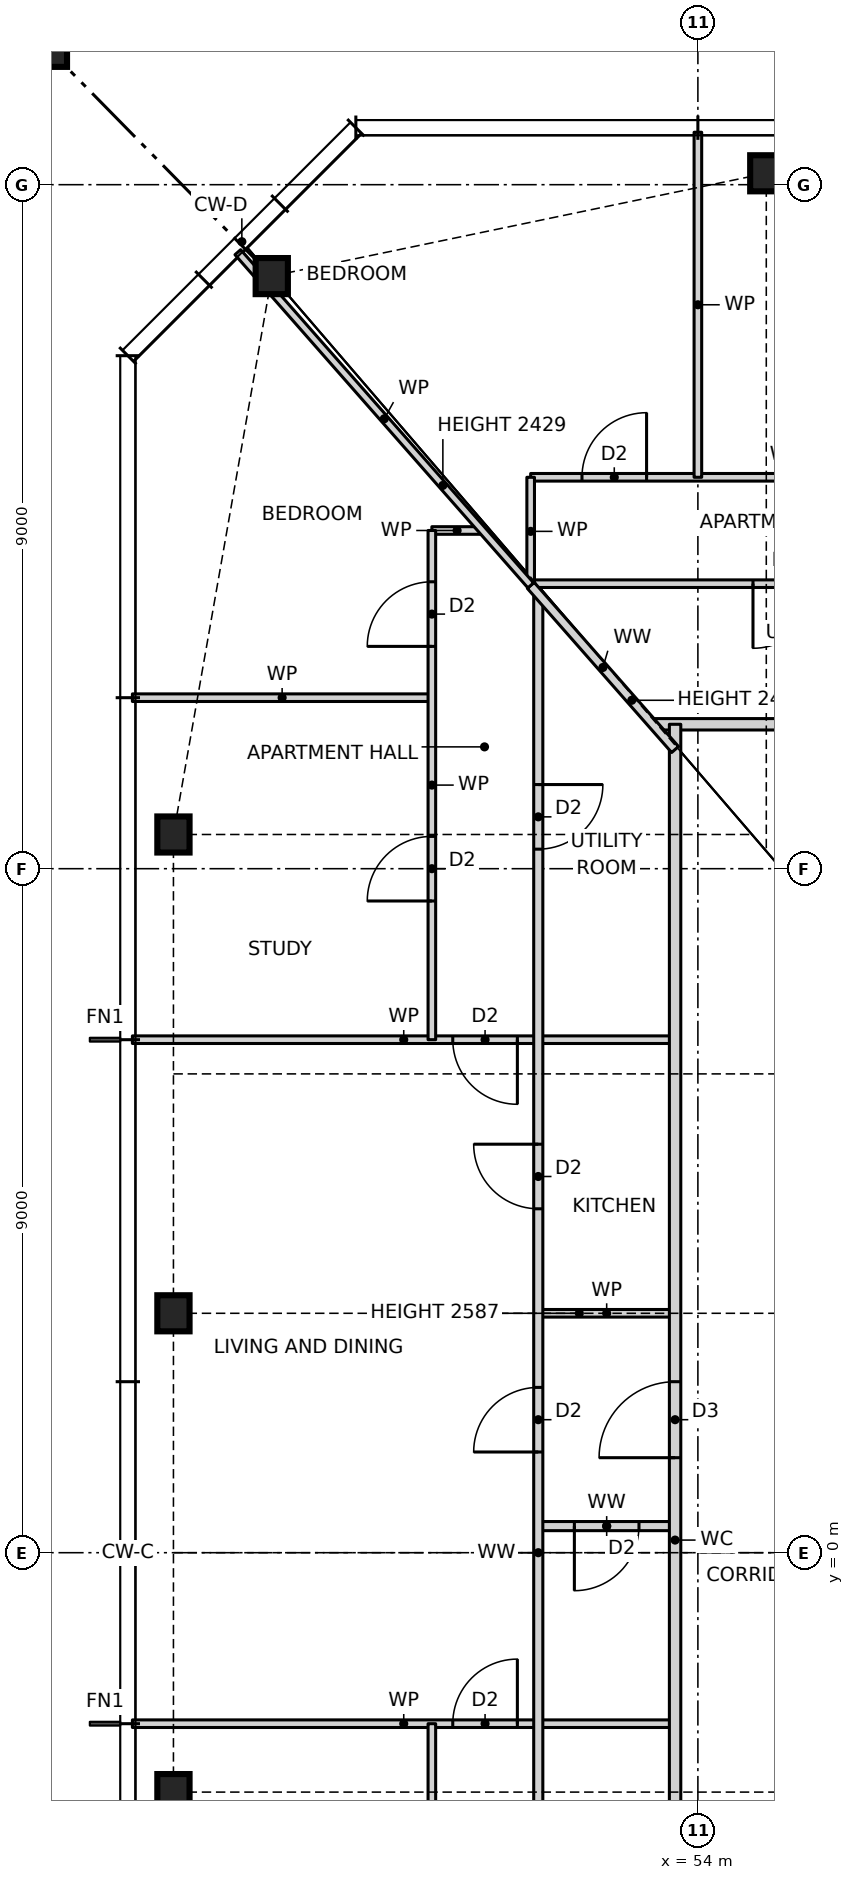
"""IFC4 building model, lengths in metres.
Left out: names, types, materials, properties, quantities, classifications, styles, units other than length and angle.
Written with IfcOpenShell. Run it as: python <this file> out.ifc"""

import sys

from ifc_helpers import new_model, si_unit, direction, frame, frame_2d, origin, origin_2d, place, context, subcontext, project, spatial, rectangle, hollow_rectangle, i_section, extrude, element, fill, save


model = new_model("IFC4")
c1 = context("Model", 3, precision=1e-05, world=origin(), true_north=direction((0.0, 1.0)))
c2 = subcontext(c1, "Body", "Model", "MODEL_VIEW")
j1 = project(units=[si_unit("LENGTHUNIT", "METRE"), si_unit("PLANEANGLEUNIT", "RADIAN")], contexts=[c1])
p1 = place(None, origin())
s1 = spatial("IfcSite", under=j1, at=p1, CompositionType="ELEMENT")
p2 = place(p1, origin())
s2 = spatial("IfcBuilding", under=s1, at=p2, CompositionType="ELEMENT")
p3 = place(p2, frame((0.0, 0.0, 36.0)))
s3 = spatial("IfcBuildingStorey", under=s2, at=p3, CompositionType="ELEMENT", Elevation=36.0)
for number, where, z_axis, x_axis in (
    (1, (54.9, 18.15, 0.0), (0.0, 0.0, 1.0), (1.0, 0.0, 0.0)),
    (2, (48.394, 16.797, 0.0), (0.0, 0.0, 1.0), (1.0, 0.0, 0.0)),
    (3, (47.1, 9.45, 0.0), (0.0, 0.0, 1.0), (1.0, 0.0, 0.0)),
    (4, (47.1, 3.15, 0.0), (0.0, 0.0, 1.0), (1.0, 0.0, 0.0)),
    (5, (47.1, -3.15, 0.0), (0.0, 0.0, 1.0), (1.0, 0.0, 0.0)),
):
    element("IfcColumn", number, at=place(p3, frame(where, z_axis=z_axis, x_axis=x_axis)), inside=s3, PredefinedType="COLUMN", context=c2, shape_type="SweptSolid", body=[
        extrude(i_section(OverallWidth=0.424, OverallDepth=0.475, WebThickness=0.048, FlangeThickness=0.077, at=origin_2d()), origin(), (0.0, 0.0, 1.0), 3.5),
    ])
p4 = place(p3, frame((45.1, 20.15, 0.0), z_axis=(0.0, 0.0, 1.0), x_axis=(1.0, 0.0, 0.0)))
e6 = element("IfcColumn", 6, at=p4, inside=s3, PredefinedType="COLUMN", context=c2, shape_type="SweptSolid", body=[
    extrude(hollow_rectangle(XDim=1.2, YDim=1.2, WallThickness=0.07, at=origin_2d()), origin(), (0.0, 0.0, 1.0), 3.5),
])
p5 = place(p3, frame((46.56, -2.25, 0.0), z_axis=(0.0, 0.0, 1.0), x_axis=(1.0, 0.0, 0.0)))
e7 = element("IfcWall", 7, at=p5, inside=s3, PredefinedType="PARTITIONING", context=c2, shape_type="SweptSolid", body=[
    extrude(rectangle(XDim=7.14, YDim=0.1, at=frame_2d((3.57, 0.0))), origin(), (0.0, 0.0, 1.0), 3.27),
])
p6 = place(p5, frame((4.215, 0.0, 0.0)))
e8 = element("IfcOpeningElement", 8, at=p6, cuts=e7, PredefinedType="OPENING", context=c2, shape_type="SweptSolid", body=[
    extrude(rectangle(XDim=0.85, YDim=2.1, at=frame_2d((0.425, 1.05))), frame((0.0, 0.06, 0.0), z_axis=(0.0, -1.0, 0.0), x_axis=(1.0, 0.0, 0.0)), (0.0, 0.0, 1.0), 0.12),
])
p7 = place(p3, frame((51.9, 0.35, 0.0), z_axis=(0.0, 0.0, 1.0), x_axis=(1.0, 0.0, 0.0)))
e9 = element("IfcWall", 9, at=p7, inside=s3, PredefinedType="PARTITIONING", context=c2, shape_type="SweptSolid", body=[
    extrude(rectangle(XDim=1.8, YDim=0.12, at=frame_2d((0.9, 0.0))), origin(), (0.0, 0.0, 1.0), 3.27),
])
p8 = place(p7, frame((0.475, 0.0, 0.0)))
e10 = element("IfcOpeningElement", 10, at=p8, cuts=e9, PredefinedType="OPENING", context=c2, shape_type="SweptSolid", body=[
    extrude(rectangle(XDim=0.85, YDim=2.1, at=frame_2d((0.425, 1.05))), frame((0.0, 0.07, 0.0), z_axis=(0.0, -1.0, 0.0), x_axis=(1.0, 0.0, 0.0)), (0.0, 0.0, 1.0), 0.14),
])
p9 = place(p3, frame((51.9, 3.15, 0.0), z_axis=(0.0, 0.0, 1.0), x_axis=(1.0, 0.0, 0.0)))
e11 = element("IfcWall", 11, at=p9, inside=s3, PredefinedType="PARTITIONING", context=c2, shape_type="SweptSolid", body=[
    extrude(rectangle(XDim=1.8, YDim=0.1, at=frame_2d((0.9, 0.0))), origin(), (0.0, 0.0, 1.0), 2.587),
])
p10 = place(p3, frame((46.56, 6.75, 0.0), z_axis=(0.0, 0.0, 1.0), x_axis=(1.0, 0.0, 0.0)))
e12 = element("IfcWall", 12, at=p10, inside=s3, PredefinedType="PARTITIONING", context=c2, shape_type="SweptSolid", body=[
    extrude(rectangle(XDim=7.14, YDim=0.1, at=frame_2d((3.57, 0.0))), origin(), (0.0, 0.0, 1.0), 3.27),
])
p11 = place(p10, frame((4.215, 0.0, 0.0)))
e13 = element("IfcOpeningElement", 13, at=p11, cuts=e12, PredefinedType="OPENING", context=c2, shape_type="SweptSolid", body=[
    extrude(rectangle(XDim=0.85, YDim=2.1, at=frame_2d((0.425, 1.05))), frame((0.0, 0.06, 0.0), z_axis=(0.0, -1.0, 0.0), x_axis=(1.0, 0.0, 0.0)), (0.0, 0.0, 1.0), 0.12),
])
p12 = place(p3, frame((53.408, 10.9, 0.0), z_axis=(0.0, 0.0, 1.0), x_axis=(1.0, 0.0, 0.0)))
e14 = element("IfcWall", 14, at=p12, inside=s3, PredefinedType="PARTITIONING", context=c2, shape_type="SweptSolid", body=[
    extrude(rectangle(XDim=19.184, YDim=0.15, at=frame_2d((9.592, 0.0))), origin(), (0.0, 0.0, 1.0), 3.27),
])
p13 = place(p12, frame((8.592, 0.0, 0.0)))
e15 = element("IfcOpeningElement", 15, at=p13, cuts=e14, PredefinedType="OPENING", context=c2, shape_type="SweptSolid", body=[
    extrude(rectangle(XDim=1.0, YDim=2.1, at=frame_2d((0.5, 1.05))), frame((0.0, 0.085, 0.0), z_axis=(0.0, -1.0, 0.0), x_axis=(1.0, 0.0, 0.0)), (0.0, 0.0, 1.0), 0.17),
])
p14 = place(p3, frame((46.56, 11.25, 0.0), z_axis=(0.0, 0.0, 1.0), x_axis=(1.0, 0.0, 0.0)))
e16 = element("IfcWall", 16, at=p14, inside=s3, PredefinedType="PARTITIONING", context=c2, shape_type="SweptSolid", body=[
    extrude(rectangle(XDim=3.94, YDim=0.1, at=frame_2d((1.97, 0.0))), origin(), (0.0, 0.0, 1.0), 3.27),
])
p15 = place(p3, frame((51.8, 12.75, 0.0), z_axis=(0.0, 0.0, 1.0), x_axis=(1.0, 0.0, 0.0)))
e17 = element("IfcWall", 17, at=p15, inside=s3, PredefinedType="PARTITIONING", context=c2, shape_type="SweptSolid", body=[
    extrude(rectangle(XDim=22.4, YDim=0.1, at=frame_2d((11.2, 0.0))), origin(), (0.0, 0.0, 1.0), 3.27),
])
p16 = place(p15, frame((13.475, 0.0, 0.0)))
e18 = element("IfcOpeningElement", 18, at=p16, cuts=e17, PredefinedType="OPENING", context=c2, shape_type="SweptSolid", body=[
    extrude(rectangle(XDim=0.85, YDim=2.1, at=frame_2d((0.425, 1.05))), frame((0.0, 0.06, 0.0), z_axis=(0.0, -1.0, 0.0), x_axis=(1.0, 0.0, 0.0)), (0.0, 0.0, 1.0), 0.12),
])
p17 = place(p15, frame((10.275, 0.0, 0.0)))
e19 = element("IfcOpeningElement", 19, at=p17, cuts=e17, PredefinedType="OPENING", context=c2, shape_type="SweptSolid", body=[
    extrude(rectangle(XDim=0.85, YDim=2.1, at=frame_2d((0.425, 1.05))), frame((0.0, 0.06, 0.0), z_axis=(0.0, -1.0, 0.0), x_axis=(1.0, 0.0, 0.0)), (0.0, 0.0, 1.0), 0.12),
])
p18 = place(p15, frame((18.625, 0.0, 0.0)))
e20 = element("IfcOpeningElement", 20, at=p18, cuts=e17, PredefinedType="OPENING", context=c2, shape_type="SweptSolid", body=[
    extrude(rectangle(XDim=0.85, YDim=2.1, at=frame_2d((0.425, 1.05))), frame((0.0, 0.06, 0.0), z_axis=(0.0, -1.0, 0.0), x_axis=(1.0, 0.0, 0.0)), (0.0, 0.0, 1.0), 0.12),
])
p19 = place(p15, frame((2.925, 0.0, 0.0)))
e21 = element("IfcOpeningElement", 21, at=p19, cuts=e17, PredefinedType="OPENING", context=c2, shape_type="SweptSolid", body=[
    extrude(rectangle(XDim=0.85, YDim=2.1, at=frame_2d((0.425, 1.05))), frame((0.0, 0.06, 0.0), z_axis=(0.0, -1.0, 0.0), x_axis=(1.0, 0.0, 0.0)), (0.0, 0.0, 1.0), 0.12),
])
p20 = place(p3, frame((50.5, 13.45, 0.0), z_axis=(0.0, 0.0, 1.0), x_axis=(1.0, 0.0, 0.0)))
e22 = element("IfcWall", 22, at=p20, inside=s3, PredefinedType="PARTITIONING", context=c2, shape_type="SweptSolid", body=[
    extrude(rectangle(XDim=0.664, YDim=0.1, at=frame_2d((0.332, 0.0))), origin(), (0.0, 0.0, 1.0), 3.27),
])
p21 = place(p3, frame((51.8, 14.15, 0.0), z_axis=(0.0, 0.0, 1.0), x_axis=(1.0, 0.0, 0.0)))
e23 = element("IfcWall", 23, at=p21, inside=s3, PredefinedType="PARTITIONING", context=c2, shape_type="SweptSolid", body=[
    extrude(rectangle(XDim=6.7, YDim=0.1, at=frame_2d((3.35, 0.0))), origin(), (0.0, 0.0, 1.0), 3.27),
])
p22 = place(p21, frame((4.025, 0.0, 0.0)))
e24 = element("IfcOpeningElement", 24, at=p22, cuts=e23, PredefinedType="OPENING", context=c2, shape_type="SweptSolid", body=[
    extrude(rectangle(XDim=0.85, YDim=2.1, at=frame_2d((0.425, 1.05))), frame((0.0, 0.06, 0.0), z_axis=(0.0, -1.0, 0.0), x_axis=(1.0, 0.0, 0.0)), (0.0, 0.0, 1.0), 0.12),
])
p23 = place(p21, frame((0.675, 0.0, 0.0)))
e25 = element("IfcOpeningElement", 25, at=p23, cuts=e23, PredefinedType="OPENING", context=c2, shape_type="SweptSolid", body=[
    extrude(rectangle(XDim=0.85, YDim=2.1, at=frame_2d((0.425, 1.05))), frame((0.0, 0.06, 0.0), z_axis=(0.0, -1.0, 0.0), x_axis=(1.0, 0.0, 0.0)), (0.0, 0.0, 1.0), 0.12),
])
p24 = place(p3, frame((54.0, 14.15, 0.0), z_axis=(0.0, 0.0, 1.0), x_axis=(0.0, 1.0, 0.0)))
e26 = element("IfcWall", 26, at=p24, inside=s3, PredefinedType="PARTITIONING", context=c2, shape_type="SweptSolid", body=[
    extrude(rectangle(XDim=4.54, YDim=0.1, at=frame_2d((2.27, 0.0))), origin(), (0.0, 0.0, 1.0), 3.27),
])
p25 = place(p3, frame((53.7, -10.568, 0.0), z_axis=(0.0, 0.0, 1.0), x_axis=(0.0, 1.0, 0.0)))
e27 = element("IfcWall", 27, at=p25, inside=s3, PredefinedType="PARTITIONING", context=c2, shape_type="SweptSolid", body=[
    extrude(rectangle(XDim=21.468, YDim=0.15, at=frame_2d((10.734, 0.0))), origin(), (0.0, 0.0, 1.0), 3.27),
])
p26 = place(p25, frame((11.818, 0.0, 0.0)))
e28 = element("IfcOpeningElement", 28, at=p26, cuts=e27, PredefinedType="OPENING", context=c2, shape_type="SweptSolid", body=[
    extrude(rectangle(XDim=1.0, YDim=2.1, at=frame_2d((0.5, 1.05))), frame((0.0, 0.085, 0.0), z_axis=(0.0, -1.0, 0.0), x_axis=(1.0, 0.0, 0.0)), (0.0, 0.0, 1.0), 0.17),
])
p27 = place(p3, frame((51.9, -12.614, 0.0), z_axis=(0.0, 0.0, 1.0), x_axis=(0.0, 1.0, 0.0)))
e29 = element("IfcWall", 29, at=p27, inside=s3, PredefinedType="PARTITIONING", context=c2, shape_type="SweptSolid", body=[
    extrude(rectangle(XDim=25.228, YDim=0.12, at=frame_2d((12.614, 0.0))), origin(), (0.0, 0.0, 1.0), 3.27),
])
p28 = place(p27, frame((17.139, 0.0, 0.0)))
e30 = element("IfcOpeningElement", 30, at=p28, cuts=e29, PredefinedType="OPENING", context=c2, shape_type="SweptSolid", body=[
    extrude(rectangle(XDim=0.85, YDim=2.1, at=frame_2d((0.425, 1.05))), frame((0.0, 0.07, 0.0), z_axis=(0.0, -1.0, 0.0), x_axis=(1.0, 0.0, 0.0)), (0.0, 0.0, 1.0), 0.14),
])
p29 = place(p27, frame((13.939, 0.0, 0.0)))
e31 = element("IfcOpeningElement", 31, at=p29, cuts=e29, PredefinedType="OPENING", context=c2, shape_type="SweptSolid", body=[
    extrude(rectangle(XDim=0.85, YDim=2.1, at=frame_2d((0.425, 1.05))), frame((0.0, 0.07, 0.0), z_axis=(0.0, -1.0, 0.0), x_axis=(1.0, 0.0, 0.0)), (0.0, 0.0, 1.0), 0.14),
])
p30 = place(p27, frame((21.871, 0.0, 0.0)))
e32 = element("IfcOpeningElement", 32, at=p30, cuts=e29, PredefinedType="OPENING", context=c2, shape_type="SweptSolid", body=[
    extrude(rectangle(XDim=0.85, YDim=2.1, at=frame_2d((0.425, 1.05))), frame((0.0, 0.07, 0.0), z_axis=(0.0, -1.0, 0.0), x_axis=(1.0, 0.0, 0.0)), (0.0, 0.0, 1.0), 0.14),
])
p31 = place(p27, frame((7.739, 0.0, 0.0)))
e33 = element("IfcOpeningElement", 33, at=p31, cuts=e29, PredefinedType="OPENING", context=c2, shape_type="SweptSolid", body=[
    extrude(rectangle(XDim=0.85, YDim=2.1, at=frame_2d((0.425, 1.05))), frame((0.0, 0.07, 0.0), z_axis=(0.0, -1.0, 0.0), x_axis=(1.0, 0.0, 0.0)), (0.0, 0.0, 1.0), 0.14),
])
p32 = place(p27, frame((2.557, 0.0, 0.0)))
e34 = element("IfcOpeningElement", 34, at=p32, cuts=e29, PredefinedType="OPENING", context=c2, shape_type="SweptSolid", body=[
    extrude(rectangle(XDim=0.85, YDim=2.1, at=frame_2d((0.425, 1.05))), frame((0.0, 0.07, 0.0), z_axis=(0.0, -1.0, 0.0), x_axis=(1.0, 0.0, 0.0)), (0.0, 0.0, 1.0), 0.14),
])
p33 = place(p3, frame((51.8, 12.727, 0.0), z_axis=(0.0, 0.0, 1.0), x_axis=(0.0, 1.0, 0.0)))
e35 = element("IfcWall", 35, at=p33, inside=s3, PredefinedType="PARTITIONING", context=c2, shape_type="SweptSolid", body=[
    extrude(rectangle(XDim=1.423, YDim=0.1, at=frame_2d((0.711, 0.0))), origin(), (0.0, 0.0, 1.0), 3.27),
])
p34 = place(p3, frame((50.5, -13.45, 0.0), z_axis=(0.0, 0.0, 1.0), x_axis=(0.0, 1.0, 0.0)))
e36 = element("IfcWall", 36, at=p34, inside=s3, PredefinedType="PARTITIONING", context=c2, shape_type="SweptSolid", body=[
    extrude(rectangle(XDim=11.2, YDim=0.1, at=frame_2d((5.6, 0.0))), origin(), (0.0, 0.0, 1.0), 3.27),
])
p35 = place(p34, frame((8.525, 0.0, 0.0)))
e37 = element("IfcOpeningElement", 37, at=p35, cuts=e36, PredefinedType="OPENING", context=c2, shape_type="SweptSolid", body=[
    extrude(rectangle(XDim=0.85, YDim=2.1, at=frame_2d((0.425, 1.05))), frame((0.0, 0.06, 0.0), z_axis=(0.0, -1.0, 0.0), x_axis=(1.0, 0.0, 0.0)), (0.0, 0.0, 1.0), 0.12),
])
p36 = place(p34, frame((4.025, 0.0, 0.0)))
e38 = element("IfcOpeningElement", 38, at=p36, cuts=e36, PredefinedType="OPENING", context=c2, shape_type="SweptSolid", body=[
    extrude(rectangle(XDim=0.85, YDim=2.1, at=frame_2d((0.425, 1.05))), frame((0.0, 0.06, 0.0), z_axis=(0.0, -1.0, 0.0), x_axis=(1.0, 0.0, 0.0)), (0.0, 0.0, 1.0), 0.12),
])
p37 = place(p34, frame((0.675, 0.0, 0.0)))
e39 = element("IfcOpeningElement", 39, at=p37, cuts=e36, PredefinedType="OPENING", context=c2, shape_type="SweptSolid", body=[
    extrude(rectangle(XDim=0.85, YDim=2.1, at=frame_2d((0.425, 1.05))), frame((0.0, 0.06, 0.0), z_axis=(0.0, -1.0, 0.0), x_axis=(1.0, 0.0, 0.0)), (0.0, 0.0, 1.0), 0.12),
])
p38 = place(p3, frame((50.5, 6.75, 0.0), z_axis=(0.0, 0.0, 1.0), x_axis=(0.0, 1.0, 0.0)))
e40 = element("IfcWall", 40, at=p38, inside=s3, PredefinedType="PARTITIONING", context=c2, shape_type="SweptSolid", body=[
    extrude(rectangle(XDim=6.7, YDim=0.1, at=frame_2d((3.35, 0.0))), origin(), (0.0, 0.0, 1.0), 3.27),
])
p39 = place(p38, frame((1.825, 0.0, 0.0)))
e41 = element("IfcOpeningElement", 41, at=p39, cuts=e40, PredefinedType="OPENING", context=c2, shape_type="SweptSolid", body=[
    extrude(rectangle(XDim=0.85, YDim=2.1, at=frame_2d((0.425, 1.05))), frame((0.0, 0.06, 0.0), z_axis=(0.0, -1.0, 0.0), x_axis=(1.0, 0.0, 0.0)), (0.0, 0.0, 1.0), 0.12),
])
p40 = place(p38, frame((5.175, 0.0, 0.0)))
e42 = element("IfcOpeningElement", 42, at=p40, cuts=e40, PredefinedType="OPENING", context=c2, shape_type="SweptSolid", body=[
    extrude(rectangle(XDim=0.85, YDim=2.1, at=frame_2d((0.425, 1.05))), frame((0.0, 0.06, 0.0), z_axis=(0.0, -1.0, 0.0), x_axis=(1.0, 0.0, 0.0)), (0.0, 0.0, 1.0), 0.12),
])
p41 = place(p3, frame((53.7, 10.568, 0.0), z_axis=(0.0, 0.0, 1.0), x_axis=(-0.660275707921, 0.751023294931, 0.0)))
e43 = element("IfcWall", 43, at=p41, inside=s3, PredefinedType="PARTITIONING", context=c2, shape_type="SweptSolid", body=[
    extrude(rectangle(XDim=2.876, YDim=0.12, at=frame_2d((1.438, 0.0))), origin(), (0.0, 0.0, 1.0), 2.429),
])
p42 = place(p3, frame((51.801, 12.728, 0.0), z_axis=(0.0, 0.0, 1.0), x_axis=(-0.660267638736, 0.751030389024, 0.0)))
e44 = element("IfcWall", 44, at=p42, inside=s3, PredefinedType="PARTITIONING", context=c2, shape_type="SweptSolid", body=[
    extrude(rectangle(XDim=5.837, YDim=0.1, at=frame_2d((2.918, 0.0))), origin(), (0.0, 0.0, 1.0), 2.429),
])
p43 = place(p23, origin())
e45 = element("IfcDoor", 45, at=p43, inside=s3, OperationType="SINGLE_SWING_RIGHT", PredefinedType="DOOR", context=c2, shape_type="SweptSolid", body=[
    extrude(rectangle(XDim=0.85, YDim=2.1, at=frame_2d((0.425, 1.05))), frame((0.0, 0.025, 0.0), z_axis=(0.0, -1.0, 0.0), x_axis=(1.0, 0.0, 0.0)), (0.0, 0.0, 1.0), 0.05),
])
fill(e25, e45)
p44 = place(p19, frame((0.85, 0.0, 0.0), z_axis=(0.0, 0.0, 1.0), x_axis=(-1.0, 0.0, 0.0)))
e46 = element("IfcDoor", 46, at=p44, inside=s3, OperationType="SINGLE_SWING_RIGHT", PredefinedType="DOOR", context=c2, shape_type="SweptSolid", body=[
    extrude(rectangle(XDim=0.85, YDim=2.1, at=frame_2d((0.425, 1.05))), frame((0.0, 0.025, 0.0), z_axis=(0.0, -1.0, 0.0), x_axis=(1.0, 0.0, 0.0)), (0.0, 0.0, 1.0), 0.05),
])
fill(e21, e46)
p45 = place(p28, origin())
e47 = element("IfcDoor", 47, at=p45, inside=s3, OperationType="SINGLE_SWING_RIGHT", PredefinedType="DOOR", context=c2, shape_type="SweptSolid", body=[
    extrude(rectangle(XDim=0.85, YDim=2.1, at=frame_2d((0.425, 1.05))), frame((0.0, 0.025, 0.0), z_axis=(0.0, -1.0, 0.0), x_axis=(1.0, 0.0, 0.0)), (0.0, 0.0, 1.0), 0.05),
])
fill(e30, e47)
p46 = place(p26, origin())
e48 = element("IfcDoor", 48, at=p46, inside=s3, OperationType="SINGLE_SWING_LEFT", PredefinedType="DOOR", context=c2, shape_type="SweptSolid", body=[
    extrude(rectangle(XDim=1.0, YDim=2.1, at=frame_2d((0.5, 1.05))), frame((0.0, 0.025, 0.0), z_axis=(0.0, -1.0, 0.0), x_axis=(1.0, 0.0, 0.0)), (0.0, 0.0, 1.0), 0.05),
])
fill(e28, e48)
p47 = place(p29, origin())
e49 = element("IfcDoor", 49, at=p47, inside=s3, OperationType="SINGLE_SWING_LEFT", PredefinedType="DOOR", context=c2, shape_type="SweptSolid", body=[
    extrude(rectangle(XDim=0.85, YDim=2.1, at=frame_2d((0.425, 1.05))), frame((0.0, 0.025, 0.0), z_axis=(0.0, -1.0, 0.0), x_axis=(1.0, 0.0, 0.0)), (0.0, 0.0, 1.0), 0.05),
])
fill(e31, e49)
p48 = place(p8, frame((0.85, 0.0, 0.0), z_axis=(0.0, 0.0, 1.0), x_axis=(-1.0, 0.0, 0.0)))
e50 = element("IfcDoor", 50, at=p48, inside=s3, OperationType="SINGLE_SWING_RIGHT", PredefinedType="DOOR", context=c2, shape_type="SweptSolid", body=[
    extrude(rectangle(XDim=0.85, YDim=2.1, at=frame_2d((0.425, 1.05))), frame((0.0, 0.025, 0.0), z_axis=(0.0, -1.0, 0.0), x_axis=(1.0, 0.0, 0.0)), (0.0, 0.0, 1.0), 0.05),
])
fill(e10, e50)
p49 = place(p11, frame((0.85, 0.0, 0.0), z_axis=(0.0, 0.0, 1.0), x_axis=(-1.0, 0.0, 0.0)))
e51 = element("IfcDoor", 51, at=p49, inside=s3, OperationType="SINGLE_SWING_LEFT", PredefinedType="DOOR", context=c2, shape_type="SweptSolid", body=[
    extrude(rectangle(XDim=0.85, YDim=2.1, at=frame_2d((0.425, 1.05))), frame((0.0, 0.025, 0.0), z_axis=(0.0, -1.0, 0.0), x_axis=(1.0, 0.0, 0.0)), (0.0, 0.0, 1.0), 0.05),
])
fill(e13, e51)
p50 = place(p39, origin())
e52 = element("IfcDoor", 52, at=p50, inside=s3, OperationType="SINGLE_SWING_LEFT", PredefinedType="DOOR", context=c2, shape_type="SweptSolid", body=[
    extrude(rectangle(XDim=0.85, YDim=2.1, at=frame_2d((0.425, 1.05))), frame((0.0, 0.025, 0.0), z_axis=(0.0, -1.0, 0.0), x_axis=(1.0, 0.0, 0.0)), (0.0, 0.0, 1.0), 0.05),
])
fill(e41, e52)
p51 = place(p40, origin())
e53 = element("IfcDoor", 53, at=p51, inside=s3, OperationType="SINGLE_SWING_LEFT", PredefinedType="DOOR", context=c2, shape_type="SweptSolid", body=[
    extrude(rectangle(XDim=0.85, YDim=2.1, at=frame_2d((0.425, 1.05))), frame((0.0, 0.025, 0.0), z_axis=(0.0, -1.0, 0.0), x_axis=(1.0, 0.0, 0.0)), (0.0, 0.0, 1.0), 0.05),
])
fill(e42, e53)
p52 = place(p30, frame((0.85, 0.0, 0.0), z_axis=(0.0, 0.0, 1.0), x_axis=(-1.0, 0.0, 0.0)))
e54 = element("IfcDoor", 54, at=p52, inside=s3, OperationType="SINGLE_SWING_LEFT", PredefinedType="DOOR", context=c2, shape_type="SweptSolid", body=[
    extrude(rectangle(XDim=0.85, YDim=2.1, at=frame_2d((0.425, 1.05))), frame((0.0, 0.025, 0.0), z_axis=(0.0, -1.0, 0.0), x_axis=(1.0, 0.0, 0.0)), (0.0, 0.0, 1.0), 0.05),
])
fill(e32, e54)
p53 = place(p6, origin())
e55 = element("IfcDoor", 55, at=p53, inside=s3, OperationType="SINGLE_SWING_RIGHT", PredefinedType="DOOR", context=c2, shape_type="SweptSolid", body=[
    extrude(rectangle(XDim=0.85, YDim=2.1, at=frame_2d((0.425, 1.05))), frame((0.0, 0.025, 0.0), z_axis=(0.0, -1.0, 0.0), x_axis=(1.0, 0.0, 0.0)), (0.0, 0.0, 1.0), 0.05),
])
fill(e8, e55)
save(model, sys.argv[1])
